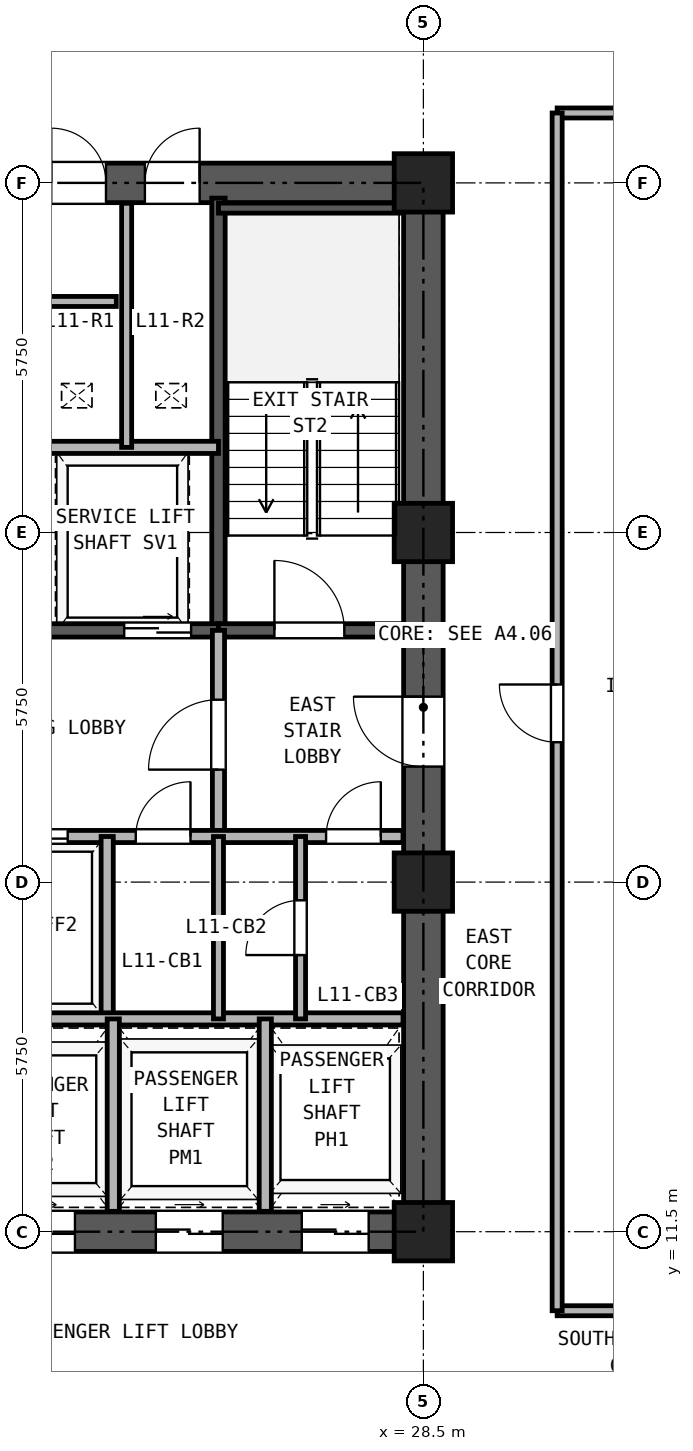
"""IFC4 building model, lengths in metres.
Left out: names, types, materials, properties, quantities, classifications, styles, units other than length and angle.
Written with IfcOpenShell. Run it as: python <this file> out.ifc"""

import sys

from ifc_helpers import new_model, si_unit, direction, frame, frame_2d, origin, origin_2d, place, context, subcontext, project, spatial, rectangle, hollow_rectangle, extrude, source, transform, mapped, element, fill, save


model = new_model("IFC4")
c1 = context("Model", 3, precision=1e-05, world=origin(), true_north=direction((0.0, 1.0)))
c2 = subcontext(c1, "Body", "Model", "MODEL_VIEW")
j1 = project(units=[si_unit("LENGTHUNIT", "METRE"), si_unit("PLANEANGLEUNIT", "RADIAN")], contexts=[c1])
p1 = place(None, origin())
s1 = spatial("IfcSite", under=j1, at=p1, CompositionType="ELEMENT")
p2 = place(p1, origin())
s2 = spatial("IfcBuilding", under=s1, at=p2, CompositionType="ELEMENT")
p3 = place(p2, frame((0.0, 0.0, 44.1)))
s3 = spatial("IfcBuildingStorey", under=s2, at=p3, CompositionType="ELEMENT", Elevation=44.1)
m1 = source(origin(), c2, "Body", "SweptSolid", [
    extrude(hollow_rectangle(XDim=0.96, YDim=0.96, WallThickness=0.06, at=origin_2d()), origin(), (0.0, 0.0, 1.0), 3.32),
])
for number, where, z_axis, x_axis in (
    (1, (28.5, 11.5, 0.0), (0.0, 0.0, 1.0), (1.0, 0.0, 0.0)),
    (2, (28.5, 17.25, 0.0), (0.0, 0.0, 1.0), (1.0, 0.0, 0.0)),
    (3, (28.5, 23.0, 0.0), (0.0, 0.0, 1.0), (1.0, 0.0, 0.0)),
    (4, (28.5, 28.75, 0.0), (0.0, 0.0, 1.0), (1.0, 0.0, 0.0)),
):
    element("IfcColumn", number, at=place(p3, frame(where, z_axis=z_axis, x_axis=x_axis)), inside=s3, PredefinedType="COLUMN", context=c2, shape_type="MappedRepresentation", body=[
        mapped(m1, transform((0.0, 0.0, 0.0), x_axis=(1.0, 0.0, 0.0), y_axis=(0.0, 1.0, 0.0), z_axis=(0.0, 0.0, 1.0), scale=1.0)),
    ])
p4 = place(p3, frame((18.175, 11.5, 0.0), z_axis=(0.0, 0.0, 1.0), x_axis=(1.0, 0.0, 0.0)))
e5 = element("IfcWall", 5, at=p4, inside=s3, PredefinedType="SHEAR", context=c2, shape_type="SweptSolid", body=[
    extrude(rectangle(XDim=10.65, YDim=0.65, at=frame_2d((5.325, 0.0))), origin(), (0.0, 0.0, 1.0), 3.32),
])
p5 = place(p4, frame((1.195, 0.0, 0.0)))
e6 = element("IfcOpeningElement", 6, at=p5, cuts=e5, PredefinedType="OPENING", context=c2, shape_type="SweptSolid", body=[
    extrude(rectangle(XDim=1.1, YDim=2.25, at=frame_2d((0.55, 1.125))), frame((0.0, 0.335, 0.0), z_axis=(0.0, -1.0, 0.0), x_axis=(1.0, 0.0, 0.0)), (0.0, 0.0, 1.0), 0.67),
])
p6 = place(p4, frame((3.495, 0.0, 0.0)))
e7 = element("IfcOpeningElement", 7, at=p6, cuts=e5, PredefinedType="OPENING", context=c2, shape_type="SweptSolid", body=[
    extrude(rectangle(XDim=1.1, YDim=2.25, at=frame_2d((0.55, 1.125))), frame((0.0, 0.335, 0.0), z_axis=(0.0, -1.0, 0.0), x_axis=(1.0, 0.0, 0.0)), (0.0, 0.0, 1.0), 0.67),
])
p7 = place(p4, frame((5.925, 0.0, 0.0)))
e8 = element("IfcOpeningElement", 8, at=p7, cuts=e5, PredefinedType="OPENING", context=c2, shape_type="SweptSolid", body=[
    extrude(rectangle(XDim=1.1, YDim=2.25, at=frame_2d((0.55, 1.125))), frame((0.0, 0.335, 0.0), z_axis=(0.0, -1.0, 0.0), x_axis=(1.0, 0.0, 0.0)), (0.0, 0.0, 1.0), 0.67),
])
p8 = place(p4, frame((8.325, 0.0, 0.0)))
e9 = element("IfcOpeningElement", 9, at=p8, cuts=e5, PredefinedType="OPENING", context=c2, shape_type="SweptSolid", body=[
    extrude(rectangle(XDim=1.1, YDim=2.25, at=frame_2d((0.55, 1.125))), frame((0.0, 0.335, 0.0), z_axis=(0.0, -1.0, 0.0), x_axis=(1.0, 0.0, 0.0)), (0.0, 0.0, 1.0), 0.67),
])
p9 = place(p3, frame((18.175, 28.75, 0.0), z_axis=(0.0, 0.0, 1.0), x_axis=(1.0, 0.0, 0.0)))
e10 = element("IfcWall", 10, at=p9, inside=s3, PredefinedType="SHEAR", context=c2, shape_type="SweptSolid", body=[
    extrude(rectangle(XDim=10.65, YDim=0.65, at=frame_2d((5.325, 0.0))), origin(), (0.0, 0.0, 1.0), 3.32),
])
p10 = place(p9, frame((4.205, 0.0, 0.0)))
e11 = element("IfcOpeningElement", 11, at=p10, cuts=e10, PredefinedType="OPENING", context=c2, shape_type="SweptSolid", body=[
    extrude(rectangle(XDim=0.9, YDim=2.05, at=frame_2d((0.45, 1.025))), frame((0.0, 0.335, 0.0), z_axis=(0.0, -1.0, 0.0), x_axis=(1.0, 0.0, 0.0)), (0.0, 0.0, 1.0), 0.67),
])
p11 = place(p9, frame((5.745, 0.0, 0.0)))
e12 = element("IfcOpeningElement", 12, at=p11, cuts=e10, PredefinedType="OPENING", context=c2, shape_type="SweptSolid", body=[
    extrude(rectangle(XDim=0.9, YDim=2.05, at=frame_2d((0.45, 1.025))), frame((0.0, 0.335, 0.0), z_axis=(0.0, -1.0, 0.0), x_axis=(1.0, 0.0, 0.0)), (0.0, 0.0, 1.0), 0.67),
])
p12 = place(p3, frame((28.5, 11.825, 0.0), z_axis=(0.0, 0.0, 1.0), x_axis=(0.0, 1.0, 0.0)))
e13 = element("IfcWall", 13, at=p12, inside=s3, PredefinedType="SHEAR", context=c2, shape_type="SweptSolid", body=[
    extrude(rectangle(XDim=16.6, YDim=0.65, at=frame_2d((8.3, 0.0))), origin(), (0.0, 0.0, 1.0), 3.32),
])
p13 = place(p12, frame((7.325, 0.0, 0.0)))
e14 = element("IfcOpeningElement", 14, at=p13, cuts=e13, PredefinedType="OPENING", context=c2, shape_type="SweptSolid", body=[
    extrude(rectangle(XDim=1.15, YDim=2.2, at=frame_2d((0.575, 1.1))), frame((0.0, 0.335, 0.0), z_axis=(0.0, -1.0, 0.0), x_axis=(1.0, 0.0, 0.0)), (0.0, 0.0, 1.0), 0.67),
])
p14 = place(p3, frame((25.13, 21.39, 0.0), z_axis=(0.0, 0.0, 1.0), x_axis=(0.0, 1.0, 0.0)))
e15 = element("IfcWall", 15, at=p14, inside=s3, PredefinedType="SOLIDWALL", context=c2, shape_type="SweptSolid", body=[
    extrude(rectangle(XDim=7.11, YDim=0.22, at=frame_2d((3.555, 0.0))), origin(), (0.0, 0.0, 1.0), 3.32),
])
p15 = place(p3, frame((25.13, 28.335, 0.0), z_axis=(0.0, 0.0, 1.0), x_axis=(1.0, 0.0, 0.0)))
e16 = element("IfcWall", 16, at=p15, inside=s3, PredefinedType="PARTITIONING", context=c2, shape_type="SweptSolid", body=[
    extrude(rectangle(XDim=3.035, YDim=0.165, at=frame_2d((1.518, 0.0))), origin(), (0.0, 0.0, 1.0), 3.32),
])
p16 = place(p3, frame((18.835, 21.39, 0.0), z_axis=(0.0, 0.0, 1.0), x_axis=(1.0, 0.0, 0.0)))
e17 = element("IfcWall", 17, at=p16, inside=s3, PredefinedType="SOLIDWALL", context=c2, shape_type="SweptSolid", body=[
    extrude(rectangle(XDim=6.295, YDim=0.22, at=frame_2d((3.147, 0.0))), origin(), (0.0, 0.0, 1.0), 3.32),
])
p17 = place(p16, frame((1.015, 0.0, 0.0)))
e18 = element("IfcOpeningElement", 18, at=p17, cuts=e17, PredefinedType="OPENING", context=c2, shape_type="SweptSolid", body=[
    extrude(rectangle(XDim=1.15, YDim=2.2, at=frame_2d((0.575, 1.1))), frame((0.0, 0.12, 0.0), z_axis=(0.0, -1.0, 0.0), x_axis=(1.0, 0.0, 0.0)), (0.0, 0.0, 1.0), 0.24),
])
p18 = place(p16, frame((4.745, 0.0, 0.0)))
e19 = element("IfcOpeningElement", 19, at=p18, cuts=e17, PredefinedType="OPENING", context=c2, shape_type="SweptSolid", body=[
    extrude(rectangle(XDim=1.1, YDim=2.25, at=frame_2d((0.55, 1.125))), frame((0.0, 0.12, 0.0), z_axis=(0.0, -1.0, 0.0), x_axis=(1.0, 0.0, 0.0)), (0.0, 0.0, 1.0), 0.24),
])
p19 = place(p3, frame((25.13, 21.39, 0.0), z_axis=(0.0, 0.0, 1.0), x_axis=(1.0, 0.0, 0.0)))
e20 = element("IfcWall", 20, at=p19, inside=s3, PredefinedType="SOLIDWALL", context=c2, shape_type="SweptSolid", body=[
    extrude(rectangle(XDim=3.035, YDim=0.22, at=frame_2d((1.518, 0.0))), origin(), (0.0, 0.0, 1.0), 3.32),
])
p20 = place(p19, frame((0.92, 0.0, 0.0)))
e21 = element("IfcOpeningElement", 21, at=p20, cuts=e20, PredefinedType="OPENING", context=c2, shape_type="SweptSolid", body=[
    extrude(rectangle(XDim=1.15, YDim=2.2, at=frame_2d((0.575, 1.1))), frame((0.0, 0.12, 0.0), z_axis=(0.0, -1.0, 0.0), x_axis=(1.0, 0.0, 0.0)), (0.0, 0.0, 1.0), 0.24),
])
p21 = place(p3, frame((22.11, 24.4, 0.0), z_axis=(0.0, 0.0, 1.0), x_axis=(1.0, 0.0, 0.0)))
e22 = element("IfcWall", 22, at=p21, inside=s3, PredefinedType="PARTITIONING", context=c2, shape_type="SweptSolid", body=[
    extrude(rectangle(XDim=3.02, YDim=0.2, at=frame_2d((1.51, 0.0))), origin(), (0.0, 0.0, 1.0), 3.32),
])
p22 = place(p3, frame((23.62, 24.4, 0.0), z_axis=(0.0, 0.0, 1.0), x_axis=(0.0, 1.0, 0.0)))
e23 = element("IfcWall", 23, at=p22, inside=s3, PredefinedType="PARTITIONING", context=c2, shape_type="SweptSolid", body=[
    extrude(rectangle(XDim=4.015, YDim=0.165, at=frame_2d((2.008, 0.0))), origin(), (0.0, 0.0, 1.0), 3.32),
])
p23 = place(p3, frame((25.13, 18.0, 0.0), z_axis=(0.0, 0.0, 1.0), x_axis=(0.0, 1.0, 0.0)))
e24 = element("IfcWall", 24, at=p23, inside=s3, PredefinedType="PARTITIONING", context=c2, shape_type="SweptSolid", body=[
    extrude(rectangle(XDim=3.39, YDim=0.2, at=frame_2d((1.695, 0.0))), origin(), (0.0, 0.0, 1.0), 3.32),
])
p24 = place(p23, frame((1.1, 0.0, 0.0)))
e25 = element("IfcOpeningElement", 25, at=p24, cuts=e24, PredefinedType="OPENING", context=c2, shape_type="SweptSolid", body=[
    extrude(rectangle(XDim=1.15, YDim=2.2, at=frame_2d((0.575, 1.1))), frame((0.0, 0.11, 0.0), z_axis=(0.0, -1.0, 0.0), x_axis=(1.0, 0.0, 0.0)), (0.0, 0.0, 1.0), 0.22),
])
p25 = place(p3, frame((18.835, 18.0, 0.0), z_axis=(0.0, 0.0, 1.0), x_axis=(1.0, 0.0, 0.0)))
e26 = element("IfcWall", 26, at=p25, inside=s3, PredefinedType="PARTITIONING", context=c2, shape_type="SweptSolid", body=[
    extrude(rectangle(XDim=9.33, YDim=0.2, at=frame_2d((4.665, 0.0))), origin(), (0.0, 0.0, 1.0), 3.32),
])
p26 = place(p25, frame((0.415, 0.0, 0.0)))
e27 = element("IfcOpeningElement", 27, at=p26, cuts=e26, PredefinedType="OPENING", context=c2, shape_type="SweptSolid", body=[
    extrude(rectangle(XDim=1.3, YDim=2.3, at=frame_2d((0.65, 1.15))), frame((0.0, 0.11, 0.0), z_axis=(0.0, -1.0, 0.0), x_axis=(1.0, 0.0, 0.0)), (0.0, 0.0, 1.0), 0.22),
])
p27 = place(p25, frame((2.515, 0.0, 0.0)))
e28 = element("IfcOpeningElement", 28, at=p27, cuts=e26, PredefinedType="OPENING", context=c2, shape_type="SweptSolid", body=[
    extrude(rectangle(XDim=1.3, YDim=2.3, at=frame_2d((0.65, 1.15))), frame((0.0, 0.11, 0.0), z_axis=(0.0, -1.0, 0.0), x_axis=(1.0, 0.0, 0.0)), (0.0, 0.0, 1.0), 0.22),
])
p28 = place(p25, frame((4.935, 0.0, 0.0)))
e29 = element("IfcOpeningElement", 29, at=p28, cuts=e26, PredefinedType="OPENING", context=c2, shape_type="SweptSolid", body=[
    extrude(rectangle(XDim=0.9, YDim=2.05, at=frame_2d((0.45, 1.025))), frame((0.0, 0.11, 0.0), z_axis=(0.0, -1.0, 0.0), x_axis=(1.0, 0.0, 0.0)), (0.0, 0.0, 1.0), 0.22),
])
p29 = place(p25, frame((8.065, 0.0, 0.0)))
e30 = element("IfcOpeningElement", 30, at=p29, cuts=e26, PredefinedType="OPENING", context=c2, shape_type="SweptSolid", body=[
    extrude(rectangle(XDim=0.9, YDim=2.05, at=frame_2d((0.45, 1.025))), frame((0.0, 0.11, 0.0), z_axis=(0.0, -1.0, 0.0), x_axis=(1.0, 0.0, 0.0)), (0.0, 0.0, 1.0), 0.22),
])
p30 = place(p3, frame((23.3, 15.0, 0.0), z_axis=(0.0, 0.0, 1.0), x_axis=(0.0, 1.0, 0.0)))
e31 = element("IfcWall", 31, at=p30, inside=s3, PredefinedType="PARTITIONING", context=c2, shape_type="SweptSolid", body=[
    extrude(rectangle(XDim=3.0, YDim=0.2, at=frame_2d((1.5, 0.0))), origin(), (0.0, 0.0, 1.0), 3.32),
])
p31 = place(p3, frame((18.835, 15.0, 0.0), z_axis=(0.0, 0.0, 1.0), x_axis=(1.0, 0.0, 0.0)))
e32 = element("IfcWall", 32, at=p31, inside=s3, PredefinedType="PARTITIONING", context=c2, shape_type="SweptSolid", body=[
    extrude(rectangle(XDim=9.33, YDim=0.2, at=frame_2d((4.665, 0.0))), origin(), (0.0, 0.0, 1.0), 3.32),
])
p32 = place(p3, frame((25.13, 15.0, 0.0), z_axis=(0.0, 0.0, 1.0), x_axis=(0.0, 1.0, 0.0)))
e33 = element("IfcWall", 33, at=p32, inside=s3, PredefinedType="PARTITIONING", context=c2, shape_type="SweptSolid", body=[
    extrude(rectangle(XDim=3.0, YDim=0.165, at=frame_2d((1.5, 0.0))), origin(), (0.0, 0.0, 1.0), 3.32),
])
p33 = place(p3, frame((26.48, 15.0, 0.0), z_axis=(0.0, 0.0, 1.0), x_axis=(0.0, 1.0, 0.0)))
e34 = element("IfcWall", 34, at=p33, inside=s3, PredefinedType="PARTITIONING", context=c2, shape_type="SweptSolid", body=[
    extrude(rectangle(XDim=3.0, YDim=0.165, at=frame_2d((1.5, 0.0))), origin(), (0.0, 0.0, 1.0), 3.32),
])
p34 = place(p33, frame((1.05, 0.0, 0.0)))
e35 = element("IfcOpeningElement", 35, at=p34, cuts=e34, PredefinedType="OPENING", context=c2, shape_type="SweptSolid", body=[
    extrude(rectangle(XDim=0.9, YDim=2.05, at=frame_2d((0.45, 1.025))), frame((0.0, 0.093, 0.0), z_axis=(0.0, -1.0, 0.0), x_axis=(1.0, 0.0, 0.0)), (0.0, 0.0, 1.0), 0.185),
])
for number, where, z_axis, x_axis in (
    (36, (23.4, 11.835, 0.0), (0.0, 0.0, 1.0), (0.0, 1.0, 0.0)),
    (37, (25.9, 11.835, 0.0), (0.0, 0.0, 1.0), (0.0, 1.0, 0.0)),
):
    element("IfcWall", number, at=place(p3, frame(where, z_axis=z_axis, x_axis=x_axis)), inside=s3, PredefinedType="PARTITIONING", context=c2, shape_type="SweptSolid", body=[
        extrude(rectangle(XDim=3.165, YDim=0.2, at=frame_2d((1.583, 0.0))), origin(), (0.0, 0.0, 1.0), 3.32),
    ])
for number, where, z_axis, x_axis in (
    (38, (30.7, 10.2, 0.0), (0.0, 0.0, 1.0), (1.0, 0.0, 0.0)),
    (39, (30.7, 29.9, 0.0), (0.0, 0.0, 1.0), (1.0, 0.0, 0.0)),
):
    element("IfcWall", number, at=place(p3, frame(where, z_axis=z_axis, x_axis=x_axis)), inside=s3, PredefinedType="PARTITIONING", context=c2, shape_type="SweptSolid", body=[
        extrude(rectangle(XDim=5.7, YDim=0.165, at=frame_2d((2.85, 0.0))), origin(), (0.0, 0.0, 1.0), 3.32),
    ])
p35 = place(p3, frame((30.7, 10.2, 0.0), z_axis=(0.0, 0.0, 1.0), x_axis=(0.0, 1.0, 0.0)))
e40 = element("IfcWall", 40, at=p35, inside=s3, PredefinedType="PARTITIONING", context=c2, shape_type="SweptSolid", body=[
    extrude(rectangle(XDim=19.7, YDim=0.165, at=frame_2d((9.85, 0.0))), origin(), (0.0, 0.0, 1.0), 3.32),
])
p36 = place(p35, frame((9.35, 0.0, 0.0)))
e41 = element("IfcOpeningElement", 41, at=p36, cuts=e40, PredefinedType="OPENING", context=c2, shape_type="SweptSolid", body=[
    extrude(rectangle(XDim=0.95, YDim=2.15, at=frame_2d((0.475, 1.075))), frame((0.0, 0.093, 0.0), z_axis=(0.0, -1.0, 0.0), x_axis=(1.0, 0.0, 0.0)), (0.0, 0.0, 1.0), 0.185),
])
p37 = place(p3, frame((22.35, 26.8, 0.0), z_axis=(0.0, 0.0, 1.0), x_axis=(1.0, 0.0, 0.0)))
e42 = element("IfcWall", 42, at=p37, inside=s3, PredefinedType="PARTITIONING", context=c2, shape_type="SweptSolid", body=[
    extrude(rectangle(XDim=1.1, YDim=0.165, at=frame_2d((0.55, 0.0))), origin(), (0.0, 0.0, 1.0), 3.32),
])
p38 = place(p20, frame((1.15, 0.0, 0.0), z_axis=(0.0, 0.0, 1.0), x_axis=(-1.0, 0.0, 0.0)))
e43 = element("IfcDoor", 43, at=p38, inside=s3, OperationType="SINGLE_SWING_LEFT", PredefinedType="DOOR", context=c2, shape_type="SweptSolid", body=[
    extrude(rectangle(XDim=1.15, YDim=2.2, at=frame_2d((0.575, 1.1))), frame((0.0, 0.025, 0.0), z_axis=(0.0, -1.0, 0.0), x_axis=(1.0, 0.0, 0.0)), (0.0, 0.0, 1.0), 0.05),
])
fill(e21, e43)
p39 = place(p18, frame((1.1, 0.0, 0.0), z_axis=(0.0, 0.0, 1.0), x_axis=(-1.0, 0.0, 0.0)))
e44 = element("IfcDoor", 44, at=p39, inside=s3, OperationType="DOUBLE_DOOR_SLIDING", PredefinedType="DOOR", context=c2, shape_type="SweptSolid", body=[
    extrude(rectangle(XDim=1.1, YDim=2.25, at=frame_2d((0.55, 1.125))), frame((0.0, 0.025, 0.0), z_axis=(0.0, -1.0, 0.0), x_axis=(1.0, 0.0, 0.0)), (0.0, 0.0, 1.0), 0.05),
])
fill(e19, e44)
p40 = place(p24, origin())
e45 = element("IfcDoor", 45, at=p40, inside=s3, OperationType="SINGLE_SWING_LEFT", PredefinedType="DOOR", context=c2, shape_type="SweptSolid", body=[
    extrude(rectangle(XDim=1.15, YDim=2.2, at=frame_2d((0.575, 1.1))), frame((0.0, 0.025, 0.0), z_axis=(0.0, -1.0, 0.0), x_axis=(1.0, 0.0, 0.0)), (0.0, 0.0, 1.0), 0.05),
])
fill(e25, e45)
p41 = place(p27, origin())
e46 = element("IfcDoor", 46, at=p41, inside=s3, OperationType="DOUBLE_DOOR_SLIDING", PredefinedType="DOOR", context=c2, shape_type="SweptSolid", body=[
    extrude(rectangle(XDim=1.3, YDim=2.3, at=frame_2d((0.65, 1.15))), frame((0.0, 0.025, 0.0), z_axis=(0.0, -1.0, 0.0), x_axis=(1.0, 0.0, 0.0)), (0.0, 0.0, 1.0), 0.05),
])
fill(e28, e46)
p42 = place(p28, frame((0.9, 0.0, 0.0), z_axis=(0.0, 0.0, 1.0), x_axis=(-1.0, 0.0, 0.0)))
e47 = element("IfcDoor", 47, at=p42, inside=s3, OperationType="SINGLE_SWING_RIGHT", PredefinedType="DOOR", context=c2, shape_type="SweptSolid", body=[
    extrude(rectangle(XDim=0.9, YDim=2.05, at=frame_2d((0.45, 1.025))), frame((0.0, 0.025, 0.0), z_axis=(0.0, -1.0, 0.0), x_axis=(1.0, 0.0, 0.0)), (0.0, 0.0, 1.0), 0.05),
])
fill(e29, e47)
p43 = place(p34, origin())
e48 = element("IfcDoor", 48, at=p43, inside=s3, OperationType="SINGLE_SWING_LEFT", PredefinedType="DOOR", context=c2, shape_type="SweptSolid", body=[
    extrude(rectangle(XDim=0.9, YDim=2.05, at=frame_2d((0.45, 1.025))), frame((0.0, 0.025, 0.0), z_axis=(0.0, -1.0, 0.0), x_axis=(1.0, 0.0, 0.0)), (0.0, 0.0, 1.0), 0.05),
])
fill(e35, e48)
p44 = place(p29, frame((0.9, 0.0, 0.0), z_axis=(0.0, 0.0, 1.0), x_axis=(-1.0, 0.0, 0.0)))
e49 = element("IfcDoor", 49, at=p44, inside=s3, OperationType="SINGLE_SWING_RIGHT", PredefinedType="DOOR", context=c2, shape_type="SweptSolid", body=[
    extrude(rectangle(XDim=0.9, YDim=2.05, at=frame_2d((0.45, 1.025))), frame((0.0, 0.025, 0.0), z_axis=(0.0, -1.0, 0.0), x_axis=(1.0, 0.0, 0.0)), (0.0, 0.0, 1.0), 0.05),
])
fill(e30, e49)
p45 = place(p13, origin())
e50 = element("IfcDoor", 50, at=p45, inside=s3, OperationType="SINGLE_SWING_RIGHT", PredefinedType="DOOR", context=c2, shape_type="SweptSolid", body=[
    extrude(rectangle(XDim=1.15, YDim=2.2, at=frame_2d((0.575, 1.1))), frame((0.0, 0.025, 0.0), z_axis=(0.0, -1.0, 0.0), x_axis=(1.0, 0.0, 0.0)), (0.0, 0.0, 1.0), 0.05),
])
fill(e14, e50)
p46 = place(p10, origin())
e51 = element("IfcDoor", 51, at=p46, inside=s3, OperationType="SINGLE_SWING_LEFT", PredefinedType="DOOR", context=c2, shape_type="SweptSolid", body=[
    extrude(rectangle(XDim=0.9, YDim=2.05, at=frame_2d((0.45, 1.025))), frame((0.0, 0.025, 0.0), z_axis=(0.0, -1.0, 0.0), x_axis=(1.0, 0.0, 0.0)), (0.0, 0.0, 1.0), 0.05),
])
fill(e11, e51)
p47 = place(p11, origin())
e52 = element("IfcDoor", 52, at=p47, inside=s3, OperationType="SINGLE_SWING_RIGHT", PredefinedType="DOOR", context=c2, shape_type="SweptSolid", body=[
    extrude(rectangle(XDim=0.9, YDim=2.05, at=frame_2d((0.45, 1.025))), frame((0.0, 0.025, 0.0), z_axis=(0.0, -1.0, 0.0), x_axis=(1.0, 0.0, 0.0)), (0.0, 0.0, 1.0), 0.05),
])
fill(e12, e52)
p48 = place(p6, frame((1.1, 0.0, 0.0), z_axis=(0.0, 0.0, 1.0), x_axis=(-1.0, 0.0, 0.0)))
e53 = element("IfcDoor", 53, at=p48, inside=s3, OperationType="DOUBLE_DOOR_SLIDING", PredefinedType="DOOR", context=c2, shape_type="SweptSolid", body=[
    extrude(rectangle(XDim=1.1, YDim=2.25, at=frame_2d((0.55, 1.125))), frame((0.0, 0.025, 0.0), z_axis=(0.0, -1.0, 0.0), x_axis=(1.0, 0.0, 0.0)), (0.0, 0.0, 1.0), 0.05),
])
fill(e7, e53)
p49 = place(p7, frame((1.1, 0.0, 0.0), z_axis=(0.0, 0.0, 1.0), x_axis=(-1.0, 0.0, 0.0)))
e54 = element("IfcDoor", 54, at=p49, inside=s3, OperationType="DOUBLE_DOOR_SLIDING", PredefinedType="DOOR", context=c2, shape_type="SweptSolid", body=[
    extrude(rectangle(XDim=1.1, YDim=2.25, at=frame_2d((0.55, 1.125))), frame((0.0, 0.025, 0.0), z_axis=(0.0, -1.0, 0.0), x_axis=(1.0, 0.0, 0.0)), (0.0, 0.0, 1.0), 0.05),
])
fill(e8, e54)
p50 = place(p8, frame((1.1, 0.0, 0.0), z_axis=(0.0, 0.0, 1.0), x_axis=(-1.0, 0.0, 0.0)))
e55 = element("IfcDoor", 55, at=p50, inside=s3, OperationType="DOUBLE_DOOR_SLIDING", PredefinedType="DOOR", context=c2, shape_type="SweptSolid", body=[
    extrude(rectangle(XDim=1.1, YDim=2.25, at=frame_2d((0.55, 1.125))), frame((0.0, 0.025, 0.0), z_axis=(0.0, -1.0, 0.0), x_axis=(1.0, 0.0, 0.0)), (0.0, 0.0, 1.0), 0.05),
])
fill(e9, e55)
p51 = place(p36, origin())
e56 = element("IfcDoor", 56, at=p51, inside=s3, OperationType="SINGLE_SWING_RIGHT", PredefinedType="DOOR", context=c2, shape_type="SweptSolid", body=[
    extrude(rectangle(XDim=0.95, YDim=2.15, at=frame_2d((0.475, 1.075))), frame((0.0, 0.025, 0.0), z_axis=(0.0, -1.0, 0.0), x_axis=(1.0, 0.0, 0.0)), (0.0, 0.0, 1.0), 0.05),
])
fill(e41, e56)
save(model, sys.argv[1])
